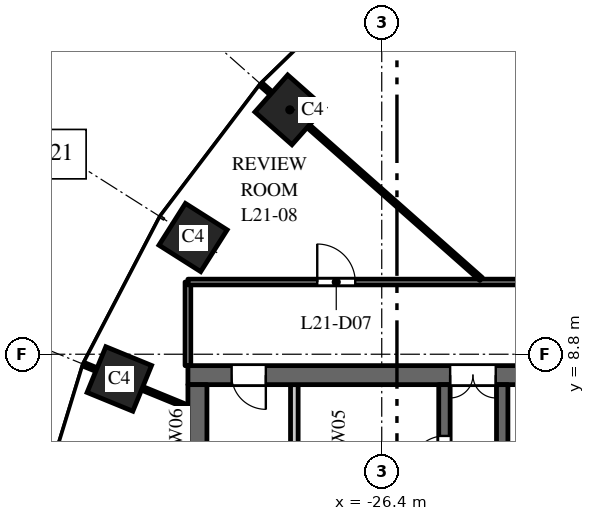
"""IFC4 building model, lengths in metres.
Left out: names, types, materials, properties, quantities, classifications, styles, units other than length and angle.
Written with IfcOpenShell. Run it as: python <this file> out.ifc"""

import sys

from ifc_helpers import new_model, si_unit, direction, frame, frame_2d, origin, origin_2d, place, context, subcontext, project, spatial, rectangle, extrude, element, fill, save


model = new_model("IFC4")
c1 = context("Model", 3, precision=1e-05, world=origin(), true_north=direction((0.0, 1.0)))
c2 = subcontext(c1, "Body", "Model", "MODEL_VIEW")
j1 = project(units=[si_unit("LENGTHUNIT", "METRE"), si_unit("PLANEANGLEUNIT", "RADIAN")], contexts=[c1])
p1 = place(None, origin())
s1 = spatial("IfcSite", under=j1, at=p1, CompositionType="ELEMENT")
p2 = place(p1, origin())
s2 = spatial("IfcBuilding", under=s1, at=p2, CompositionType="ELEMENT")
p3 = place(p2, frame((0.0, 0.0, 96.0)))
s3 = spatial("IfcBuildingStorey", under=s2, at=p3, CompositionType="ELEMENT", Elevation=96.0)
for number, where, z_axis, x_axis in (
    (1, (-28.819, 15.23, 0.0), (0.0, 0.0, 1.0), (-0.663, -0.749, 0.0)),
    (2, (-31.365, 11.871, 0.0), (0.0, 0.0, 1.0), (-0.535, -0.845, 0.0)),
    (3, (-33.305, 8.149, 0.0), (0.0, 0.0, 1.0), (-0.379, -0.925, 0.0)),
):
    element("IfcColumn", number, at=place(p3, frame(where, z_axis=z_axis, x_axis=x_axis)), inside=s3, PredefinedType="COLUMN", context=c2, shape_type="SweptSolid", body=[
        extrude(rectangle(XDim=1.3, YDim=1.3, at=origin_2d()), origin(), (0.0, 0.0, 1.0), 4.0),
    ])
p4 = place(p3, frame((-16.5, 8.25, 0.0), z_axis=(0.0, 0.0, 1.0), x_axis=(-1.0, 0.0, 0.0)))
e4 = element("IfcWall", 4, at=p4, inside=s3, PredefinedType="SHEAR", context=c2, shape_type="SweptSolid", body=[
    extrude(rectangle(XDim=15.0, YDim=0.5, at=frame_2d((7.5, 0.0))), origin(), (0.0, 0.0, 1.0), 3.7),
])
p5 = place(p4, frame((6.9, 0.0, 0.0)))
e5 = element("IfcOpeningElement", 5, at=p5, cuts=e4, PredefinedType="OPENING", context=c2, shape_type="SweptSolid", body=[
    extrude(rectangle(XDim=1.2, YDim=2.1, at=frame_2d((0.6, 1.05))), frame((0.0, 0.26, 0.0), z_axis=(0.0, -1.0, 0.0), x_axis=(1.0, 0.0, 0.0)), (0.0, 0.0, 1.0), 0.52),
])
p6 = place(p4, frame((12.95, 0.0, 0.0)))
e6 = element("IfcOpeningElement", 6, at=p6, cuts=e4, PredefinedType="OPENING", context=c2, shape_type="SweptSolid", body=[
    extrude(rectangle(XDim=0.9, YDim=2.1, at=frame_2d((0.45, 1.05))), frame((0.0, 0.26, 0.0), z_axis=(0.0, -1.0, 0.0), x_axis=(1.0, 0.0, 0.0)), (0.0, 0.0, 1.0), 0.52),
])
p7 = place(p3, frame((-24.75, -8.0, 0.0), z_axis=(0.0, 0.0, 1.0), x_axis=(0.0, 1.0, 0.0)))
e7 = element("IfcWall", 7, at=p7, inside=s3, PredefinedType="SHEAR", context=c2, shape_type="SweptSolid", body=[
    extrude(rectangle(XDim=16.0, YDim=0.3, at=frame_2d((8.0, 0.0))), origin(), (0.0, 0.0, 1.0), 3.7),
])
p8 = place(p7, frame((4.425, 0.0, 0.0)))
e8 = element("IfcOpeningElement", 8, at=p8, cuts=e7, PredefinedType="OPENING", context=c2, shape_type="SweptSolid", body=[
    extrude(rectangle(XDim=1.1, YDim=2.1, at=frame_2d((0.55, 1.05))), frame((0.0, 0.16, 0.0), z_axis=(0.0, -1.0, 0.0), x_axis=(1.0, 0.0, 0.0)), (0.0, 0.0, 1.0), 0.32),
])
p9 = place(p7, frame((7.45, 0.0, 0.0)))
e9 = element("IfcOpeningElement", 9, at=p9, cuts=e7, PredefinedType="OPENING", context=c2, shape_type="SweptSolid", body=[
    extrude(rectangle(XDim=1.1, YDim=2.1, at=frame_2d((0.55, 1.05))), frame((0.0, 0.16, 0.0), z_axis=(0.0, -1.0, 0.0), x_axis=(1.0, 0.0, 0.0)), (0.0, 0.0, 1.0), 0.32),
])
p10 = place(p7, frame((10.425, 0.0, 0.0)))
e10 = element("IfcOpeningElement", 10, at=p10, cuts=e7, PredefinedType="OPENING", context=c2, shape_type="SweptSolid", body=[
    extrude(rectangle(XDim=1.2, YDim=2.1, at=frame_2d((0.6, 1.05))), frame((0.0, 0.16, 0.0), z_axis=(0.0, -1.0, 0.0), x_axis=(1.0, 0.0, 0.0)), (0.0, 0.0, 1.0), 0.32),
])
p11 = place(p7, frame((13.75, 0.0, 0.0)))
e11 = element("IfcOpeningElement", 11, at=p11, cuts=e7, PredefinedType="OPENING", context=c2, shape_type="SweptSolid", body=[
    extrude(rectangle(XDim=0.9, YDim=2.1, at=frame_2d((0.45, 1.05))), frame((0.0, 0.16, 0.0), z_axis=(0.0, -1.0, 0.0), x_axis=(1.0, 0.0, 0.0)), (0.0, 0.0, 1.0), 0.32),
])
p12 = place(p7, frame((1.35, 0.0, 0.0)))
e12 = element("IfcOpeningElement", 12, at=p12, cuts=e7, PredefinedType="OPENING", context=c2, shape_type="SweptSolid", body=[
    extrude(rectangle(XDim=0.9, YDim=2.1, at=frame_2d((0.45, 1.05))), frame((0.0, 0.16, 0.0), z_axis=(0.0, -1.0, 0.0), x_axis=(1.0, 0.0, 0.0)), (0.0, 0.0, 1.0), 0.32),
])
p13 = place(p3, frame((-31.25, -8.0, 0.0), z_axis=(0.0, 0.0, 1.0), x_axis=(0.0, 1.0, 0.0)))
e13 = element("IfcWall", 13, at=p13, inside=s3, PredefinedType="SHEAR", context=c2, shape_type="SweptSolid", body=[
    extrude(rectangle(XDim=16.0, YDim=0.5, at=frame_2d((8.0, 0.0))), origin(), (0.0, 0.0, 1.0), 3.7),
])
p14 = place(p3, frame((-28.7, 4.75, 0.0), z_axis=(0.0, 0.0, 1.0), x_axis=(0.0, 1.0, 0.0)))
e14 = element("IfcWall", 14, at=p14, inside=s3, PredefinedType="PARTITIONING", context=c2, shape_type="SweptSolid", body=[
    extrude(rectangle(XDim=3.25, YDim=0.2, at=frame_2d((1.625, 0.0))), origin(), (0.0, 0.0, 1.0), 3.7),
])
p15 = place(p3, frame((-23.23, 2.25, 0.0), z_axis=(0.0, 0.0, 1.0), x_axis=(0.0, 1.0, 0.0)))
e15 = element("IfcWall", 15, at=p15, inside=s3, PredefinedType="SHEAR", context=c2, shape_type="SweptSolid", body=[
    extrude(rectangle(XDim=5.75, YDim=0.3, at=frame_2d((2.875, 0.0))), origin(), (0.0, 0.0, 1.0), 3.7),
])
p16 = place(p15, frame((0.6, 0.0, 0.0)))
e16 = element("IfcOpeningElement", 16, at=p16, cuts=e15, PredefinedType="OPENING", context=c2, shape_type="SweptSolid", body=[
    extrude(rectangle(XDim=1.0, YDim=2.1, at=frame_2d((0.5, 1.05))), frame((0.0, 0.16, 0.0), z_axis=(0.0, -1.0, 0.0), x_axis=(1.0, 0.0, 0.0)), (0.0, 0.0, 1.0), 0.32),
])
p17 = place(p3, frame((-34.234, 8.53, 0.0), z_axis=(0.0, 0.0, 1.0), x_axis=(0.925344112436, -0.379128307542, 0.0)))
e17 = element("IfcWall", 17, at=p17, inside=s3, PredefinedType="PARTITIONING", context=c2, shape_type="SweptSolid", body=[
    extrude(rectangle(XDim=2.954, YDim=0.1, at=frame_2d((1.477, 0.0))), origin(), (0.0, 0.0, 1.0), 2.9),
])
p18 = place(p3, frame((-31.5, 8.5, 0.0), z_axis=(0.0, 0.0, 1.0), x_axis=(0.0, 1.0, 0.0)))
e18 = element("IfcWall", 18, at=p18, inside=s3, PredefinedType="PARTITIONING", context=c2, shape_type="SweptSolid", body=[
    extrude(rectangle(XDim=2.2, YDim=0.15, at=frame_2d((1.1, 0.0))), origin(), (0.0, 0.0, 1.0), 3.7),
])
p19 = place(p3, frame((-31.5, 10.7, 0.0), z_axis=(0.0, 0.0, 1.0), x_axis=(1.0, 0.0, 0.0)))
e19 = element("IfcWall", 19, at=p19, inside=s3, PredefinedType="PARTITIONING", context=c2, shape_type="SweptSolid", body=[
    extrude(rectangle(XDim=15.0, YDim=0.15, at=frame_2d((7.5, 0.0))), origin(), (0.0, 0.0, 1.0), 3.1),
])
p20 = place(p19, frame((3.403, 0.0, 0.0)))
e20 = element("IfcOpeningElement", 20, at=p20, cuts=e19, PredefinedType="OPENING", context=c2, shape_type="SweptSolid", body=[
    extrude(rectangle(XDim=1.0, YDim=2.1, at=frame_2d((0.5, 1.05))), frame((0.0, 0.085, 0.0), z_axis=(0.0, -1.0, 0.0), x_axis=(1.0, 0.0, 0.0)), (0.0, 0.0, 1.0), 0.17),
])
p21 = place(p19, frame((10.85, 0.0, 0.0)))
e21 = element("IfcOpeningElement", 21, at=p21, cuts=e19, PredefinedType="OPENING", context=c2, shape_type="SweptSolid", body=[
    extrude(rectangle(XDim=1.0, YDim=2.1, at=frame_2d((0.5, 1.05))), frame((0.0, 0.085, 0.0), z_axis=(0.0, -1.0, 0.0), x_axis=(1.0, 0.0, 0.0)), (0.0, 0.0, 1.0), 0.17),
])
p22 = place(p3, frame((-29.569, 15.895, 0.0), z_axis=(0.0, 0.0, 1.0), x_axis=(0.748985701008, -0.662586160198, 0.0)))
e22 = element("IfcWall", 22, at=p22, inside=s3, PredefinedType="PARTITIONING", context=c2, shape_type="SweptSolid", body=[
    extrude(rectangle(XDim=7.723, YDim=0.1, at=frame_2d((3.861, 0.0))), origin(), (0.0, 0.0, 1.0), 2.9),
])
p23 = place(p5, origin())
e23 = element("IfcDoor", 23, at=p23, inside=s3, OperationType="DOUBLE_DOOR_DOUBLE_SWING", PredefinedType="DOOR", context=c2, shape_type="SweptSolid", body=[
    extrude(rectangle(XDim=1.2, YDim=2.1, at=frame_2d((0.6, 1.05))), frame((0.0, 0.025, 0.0), z_axis=(0.0, -1.0, 0.0), x_axis=(1.0, 0.0, 0.0)), (0.0, 0.0, 1.0), 0.05),
])
fill(e5, e23)
p24 = place(p11, origin())
e24 = element("IfcDoor", 24, at=p24, inside=s3, OperationType="SINGLE_SWING_RIGHT", PredefinedType="DOOR", context=c2, shape_type="SweptSolid", body=[
    extrude(rectangle(XDim=0.9, YDim=2.1, at=frame_2d((0.45, 1.05))), frame((0.0, 0.025, 0.0), z_axis=(0.0, -1.0, 0.0), x_axis=(1.0, 0.0, 0.0)), (0.0, 0.0, 1.0), 0.05),
])
fill(e11, e24)
p25 = place(p6, origin())
e25 = element("IfcDoor", 25, at=p25, inside=s3, OperationType="SINGLE_SWING_RIGHT", PredefinedType="DOOR", context=c2, shape_type="SweptSolid", body=[
    extrude(rectangle(XDim=0.9, YDim=2.1, at=frame_2d((0.45, 1.05))), frame((0.0, 0.025, 0.0), z_axis=(0.0, -1.0, 0.0), x_axis=(1.0, 0.0, 0.0)), (0.0, 0.0, 1.0), 0.05),
])
fill(e6, e25)
p26 = place(p20, origin())
e26 = element("IfcDoor", 26, at=p26, inside=s3, OperationType="SINGLE_SWING_LEFT", PredefinedType="DOOR", context=c2, shape_type="SweptSolid", body=[
    extrude(rectangle(XDim=1.0, YDim=2.1, at=frame_2d((0.5, 1.05))), frame((0.0, 0.025, 0.0), z_axis=(0.0, -1.0, 0.0), x_axis=(1.0, 0.0, 0.0)), (0.0, 0.0, 1.0), 0.05),
])
fill(e20, e26)
save(model, sys.argv[1])
